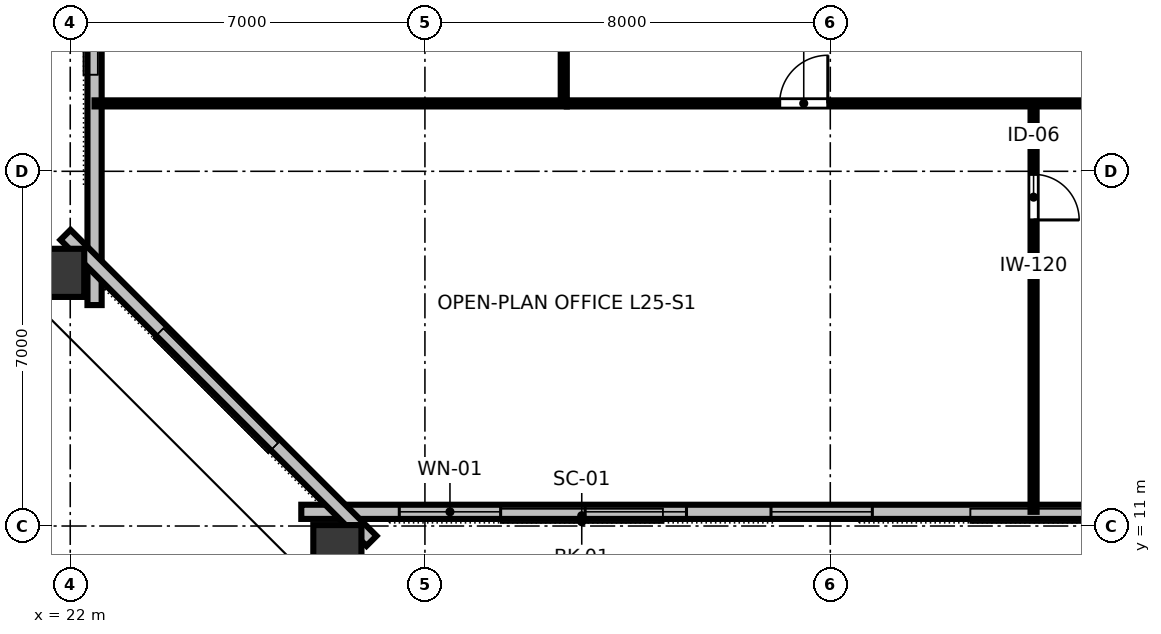
"""IFC4 building model, lengths in metres.
Left out: names, types, materials, properties, quantities, classifications, styles, units other than length and angle.
Written with IfcOpenShell. Run it as: python <this file> out.ifc"""

import sys

from ifc_helpers import new_model, si_unit, direction, frame, frame_2d, origin, origin_2d, place, context, subcontext, project, spatial, rectangle, hollow_rectangle, extrude, element, fill, save


model = new_model("IFC4")
c1 = context("Model", 3, precision=1e-05, world=origin(), true_north=direction((0.0, 1.0)))
c2 = subcontext(c1, "Body", "Model", "MODEL_VIEW")
j1 = project(units=[si_unit("LENGTHUNIT", "METRE"), si_unit("PLANEANGLEUNIT", "RADIAN")], contexts=[c1])
p1 = place(None, origin())
s1 = spatial("IfcSite", under=j1, at=p1, CompositionType="ELEMENT")
p2 = place(p1, origin())
s2 = spatial("IfcBuilding", under=s1, at=p2, CompositionType="ELEMENT")
p3 = place(p2, frame((0.0, 0.0, 98.8)))
s3 = spatial("IfcBuildingStorey", under=s2, at=p3, CompositionType="ELEMENT", Elevation=98.8)
for number, where, z_axis, x_axis in (
    (1, (27.272, 10.444, 0.0), (0.0, 0.0, 1.0), (1.0, 0.0, 0.0)),
    (2, (21.701, 15.996, 0.0), (0.0, 0.0, 1.0), (0.0, 1.0, 0.0)),
):
    element("IfcColumn", number, at=place(p3, frame(where, z_axis=z_axis, x_axis=x_axis)), inside=s3, PredefinedType="COLUMN", context=c2, shape_type="SweptSolid", body=[
        extrude(hollow_rectangle(XDim=0.95, YDim=1.15, WallThickness=0.06, at=origin_2d()), origin(), (0.0, 0.0, 1.0), 3.358),
    ])
p4 = place(p3, frame((26.56, 11.28, 0.0), z_axis=(0.0, 0.0, 1.0), x_axis=(1.0, 0.0, 0.0)))
e3 = element("IfcWall", 3, at=p4, inside=s3, PredefinedType="STANDARD", context=c2, shape_type="SweptSolid", body=[
    extrude(rectangle(XDim=38.88, YDim=0.28, at=frame_2d((19.44, 0.0))), origin(), (0.0, 0.0, 1.0), 3.36),
])
p5 = place(p4, frame((1.934, 0.0, 0.8)))
e4 = element("IfcOpeningElement", 4, at=p5, cuts=e3, PredefinedType="OPENING", context=c2, shape_type="SweptSolid", body=[
    extrude(rectangle(XDim=2.0, YDim=1.95, at=frame_2d((1.0, 0.975))), frame((0.0, 0.15, 0.0), z_axis=(0.0, -1.0, 0.0), x_axis=(1.0, 0.0, 0.0)), (0.0, 0.0, 1.0), 0.3),
])
p6 = place(p4, frame((5.602, 0.0, 0.8)))
e5 = element("IfcOpeningElement", 5, at=p6, cuts=e3, PredefinedType="OPENING", context=c2, shape_type="SweptSolid", body=[
    extrude(rectangle(XDim=2.0, YDim=1.95, at=frame_2d((1.0, 0.975))), frame((0.0, 0.15, 0.0), z_axis=(0.0, -1.0, 0.0), x_axis=(1.0, 0.0, 0.0)), (0.0, 0.0, 1.0), 0.3),
])
p7 = place(p4, frame((9.27, 0.0, 0.8)))
e6 = element("IfcOpeningElement", 6, at=p7, cuts=e3, PredefinedType="OPENING", context=c2, shape_type="SweptSolid", body=[
    extrude(rectangle(XDim=2.0, YDim=1.95, at=frame_2d((1.0, 0.975))), frame((0.0, 0.15, 0.0), z_axis=(0.0, -1.0, 0.0), x_axis=(1.0, 0.0, 0.0)), (0.0, 0.0, 1.0), 0.3),
])
p8 = place(p4, frame((23.942, 0.0, 0.8)))
e7 = element("IfcOpeningElement", 7, at=p8, cuts=e3, PredefinedType="OPENING", context=c2, shape_type="SweptSolid", body=[
    extrude(rectangle(XDim=2.0, YDim=1.95, at=frame_2d((1.0, 0.975))), frame((0.0, 0.15, 0.0), z_axis=(0.0, -1.0, 0.0), x_axis=(1.0, 0.0, 0.0)), (0.0, 0.0, 1.0), 0.3),
])
p9 = place(p4, frame((27.61, 0.0, 0.8)))
e8 = element("IfcOpeningElement", 8, at=p9, cuts=e3, PredefinedType="OPENING", context=c2, shape_type="SweptSolid", body=[
    extrude(rectangle(XDim=2.0, YDim=1.95, at=frame_2d((1.0, 0.975))), frame((0.0, 0.15, 0.0), z_axis=(0.0, -1.0, 0.0), x_axis=(1.0, 0.0, 0.0)), (0.0, 0.0, 1.0), 0.3),
])
p10 = place(p4, frame((31.278, 0.0, 0.8)))
e9 = element("IfcOpeningElement", 9, at=p10, cuts=e3, PredefinedType="OPENING", context=c2, shape_type="SweptSolid", body=[
    extrude(rectangle(XDim=2.0, YDim=1.95, at=frame_2d((1.0, 0.975))), frame((0.0, 0.15, 0.0), z_axis=(0.0, -1.0, 0.0), x_axis=(1.0, 0.0, 0.0)), (0.0, 0.0, 1.0), 0.3),
])
p11 = place(p4, frame((34.946, 0.0, 0.8)))
e10 = element("IfcOpeningElement", 10, at=p11, cuts=e3, PredefinedType="OPENING", context=c2, shape_type="SweptSolid", body=[
    extrude(rectangle(XDim=2.0, YDim=1.95, at=frame_2d((1.0, 0.975))), frame((0.0, 0.15, 0.0), z_axis=(0.0, -1.0, 0.0), x_axis=(1.0, 0.0, 0.0)), (0.0, 0.0, 1.0), 0.3),
])
p12 = place(p3, frame((22.48, 48.64, 0.0), z_axis=(0.0, 0.0, 1.0), x_axis=(0.0, -1.0, 0.0)))
e11 = element("IfcWall", 11, at=p12, inside=s3, PredefinedType="STANDARD", context=c2, shape_type="SweptSolid", body=[
    extrude(rectangle(XDim=33.28, YDim=0.28, at=frame_2d((16.64, 0.0))), origin(), (0.0, 0.0, 1.0), 3.36),
])
p13 = place(p12, frame((5.927, 0.0, 0.8)))
e12 = element("IfcOpeningElement", 12, at=p13, cuts=e11, PredefinedType="OPENING", context=c2, shape_type="SweptSolid", body=[
    extrude(rectangle(XDim=2.0, YDim=1.95, at=frame_2d((1.0, 0.975))), frame((0.0, 0.15, 0.0), z_axis=(0.0, -1.0, 0.0), x_axis=(1.0, 0.0, 0.0)), (0.0, 0.0, 1.0), 0.3),
])
p14 = place(p12, frame((9.812, 0.0, 0.8)))
e13 = element("IfcOpeningElement", 13, at=p14, cuts=e11, PredefinedType="OPENING", context=c2, shape_type="SweptSolid", body=[
    extrude(rectangle(XDim=2.0, YDim=1.95, at=frame_2d((1.0, 0.975))), frame((0.0, 0.15, 0.0), z_axis=(0.0, -1.0, 0.0), x_axis=(1.0, 0.0, 0.0)), (0.0, 0.0, 1.0), 0.3),
])
p15 = place(p12, frame((21.468, 0.0, 0.8)))
e14 = element("IfcOpeningElement", 14, at=p15, cuts=e11, PredefinedType="OPENING", context=c2, shape_type="SweptSolid", body=[
    extrude(rectangle(XDim=2.0, YDim=1.95, at=frame_2d((1.0, 0.975))), frame((0.0, 0.15, 0.0), z_axis=(0.0, -1.0, 0.0), x_axis=(1.0, 0.0, 0.0)), (0.0, 0.0, 1.0), 0.3),
])
p16 = place(p12, frame((25.353, 0.0, 0.8)))
e15 = element("IfcOpeningElement", 15, at=p16, cuts=e11, PredefinedType="OPENING", context=c2, shape_type="SweptSolid", body=[
    extrude(rectangle(XDim=2.0, YDim=1.95, at=frame_2d((1.0, 0.975))), frame((0.0, 0.15, 0.0), z_axis=(0.0, -1.0, 0.0), x_axis=(1.0, 0.0, 0.0)), (0.0, 0.0, 1.0), 0.3),
])
p17 = place(p3, frame((21.906, 16.746, 0.0), z_axis=(0.0, 0.0, 1.0), x_axis=(0.707106781187, -0.707106781187, 0.0)))
e16 = element("IfcWall", 16, at=p17, inside=s3, PredefinedType="STANDARD", context=c2, shape_type="SweptSolid", body=[
    extrude(rectangle(XDim=8.541, YDim=0.28, at=frame_2d((4.271, 0.0))), origin(), (0.0, 0.0, 1.0), 3.36),
])
p18 = place(p3, frame((41.012, 19.34, 0.0), z_axis=(0.0, 0.0, 1.0), x_axis=(0.0, -1.0, 0.0)))
e17 = element("IfcWall", 17, at=p18, inside=s3, PredefinedType="PARTITIONING", context=c2, shape_type="SweptSolid", body=[
    extrude(rectangle(XDim=8.06, YDim=0.12, at=frame_2d((4.03, 0.0))), origin(), (0.0, 0.0, 1.0), 2.64),
])
p19 = place(p18, frame((1.4, 0.0, 0.0)))
e18 = element("IfcOpeningElement", 18, at=p19, cuts=e17, PredefinedType="OPENING", context=c2, shape_type="SweptSolid", body=[
    extrude(rectangle(XDim=0.9, YDim=2.15, at=frame_2d((0.45, 1.075))), frame((0.0, 0.07, 0.0), z_axis=(0.0, -1.0, 0.0), x_axis=(1.0, 0.0, 0.0)), (0.0, 0.0, 1.0), 0.14),
])
p20 = place(p3, frame((31.8, 19.34, 0.0), z_axis=(0.0, 0.0, 1.0), x_axis=(1.0, 0.0, 0.0)))
e19 = element("IfcWall", 19, at=p20, inside=s3, PredefinedType="PARTITIONING", context=c2, shape_type="SweptSolid", body=[
    extrude(rectangle(XDim=28.4, YDim=0.12, at=frame_2d((14.2, 0.0))), origin(), (0.0, 0.0, 1.0), 2.64),
])
p21 = place(p20, frame((4.201, 0.0, 0.0)))
e20 = element("IfcOpeningElement", 20, at=p21, cuts=e19, PredefinedType="OPENING", context=c2, shape_type="SweptSolid", body=[
    extrude(rectangle(XDim=0.95, YDim=2.15, at=frame_2d((0.475, 1.075))), frame((0.0, 0.07, 0.0), z_axis=(0.0, -1.0, 0.0), x_axis=(1.0, 0.0, 0.0)), (0.0, 0.0, 1.0), 0.14),
])
p22 = place(p20, frame((11.29, 0.0, 0.0)))
e21 = element("IfcOpeningElement", 21, at=p22, cuts=e19, PredefinedType="OPENING", context=c2, shape_type="SweptSolid", body=[
    extrude(rectangle(XDim=0.95, YDim=2.15, at=frame_2d((0.475, 1.075))), frame((0.0, 0.07, 0.0), z_axis=(0.0, -1.0, 0.0), x_axis=(1.0, 0.0, 0.0)), (0.0, 0.0, 1.0), 0.14),
])
p23 = place(p20, frame((17.423, 0.0, 0.0)))
e22 = element("IfcOpeningElement", 22, at=p23, cuts=e19, PredefinedType="OPENING", context=c2, shape_type="SweptSolid", body=[
    extrude(rectangle(XDim=0.95, YDim=2.15, at=frame_2d((0.475, 1.075))), frame((0.0, 0.07, 0.0), z_axis=(0.0, -1.0, 0.0), x_axis=(1.0, 0.0, 0.0)), (0.0, 0.0, 1.0), 0.14),
])
p24 = place(p20, frame((24.394, 0.0, 0.0)))
e23 = element("IfcOpeningElement", 23, at=p24, cuts=e19, PredefinedType="OPENING", context=c2, shape_type="SweptSolid", body=[
    extrude(rectangle(XDim=0.95, YDim=2.15, at=frame_2d((0.475, 1.075))), frame((0.0, 0.07, 0.0), z_axis=(0.0, -1.0, 0.0), x_axis=(1.0, 0.0, 0.0)), (0.0, 0.0, 1.0), 0.14),
])
p25 = place(p3, frame((31.74, 19.4, 0.0), z_axis=(0.0, 0.0, 1.0), x_axis=(0.0, 1.0, 0.0)))
e24 = element("IfcWall", 24, at=p25, inside=s3, PredefinedType="PARTITIONING", context=c2, shape_type="SweptSolid", body=[
    extrude(rectangle(XDim=11.58, YDim=0.12, at=frame_2d((5.79, 0.0))), origin(), (0.0, 0.0, 1.0), 2.64),
])
p26 = place(p25, frame((5.415, 0.0, 0.0)))
e25 = element("IfcOpeningElement", 25, at=p26, cuts=e24, PredefinedType="OPENING", context=c2, shape_type="SweptSolid", body=[
    extrude(rectangle(XDim=0.95, YDim=2.15, at=frame_2d((0.475, 1.075))), frame((0.0, 0.07, 0.0), z_axis=(0.0, -1.0, 0.0), x_axis=(1.0, 0.0, 0.0)), (0.0, 0.0, 1.0), 0.14),
])
p27 = place(p3, frame((31.8, 19.34, 0.0), z_axis=(0.0, 0.0, 1.0), x_axis=(-1.0, 0.0, 0.0)))
e26 = element("IfcWall", 26, at=p27, inside=s3, PredefinedType="PARTITIONING", context=c2, shape_type="SweptSolid", body=[
    extrude(rectangle(XDim=9.32, YDim=0.12, at=frame_2d((4.66, 0.0))), origin(), (0.0, 0.0, 1.0), 2.64),
])
p28 = place(p5, origin())
e27 = element("IfcWindow", 27, at=p28, inside=s3, PartitioningType="SINGLE_PANEL", PredefinedType="WINDOW", context=c2, shape_type="SweptSolid", body=[
    extrude(rectangle(XDim=2.0, YDim=1.95, at=frame_2d((1.0, 0.975))), frame((0.0, 0.03, 0.0), z_axis=(0.0, -1.0, 0.0), x_axis=(1.0, 0.0, 0.0)), (0.0, 0.0, 1.0), 0.06),
])
fill(e4, e27)
p29 = place(p6, origin())
e28 = element("IfcWindow", 28, at=p29, inside=s3, PartitioningType="SINGLE_PANEL", PredefinedType="WINDOW", context=c2, shape_type="SweptSolid", body=[
    extrude(rectangle(XDim=2.0, YDim=1.95, at=frame_2d((1.0, 0.975))), frame((0.0, 0.03, 0.0), z_axis=(0.0, -1.0, 0.0), x_axis=(1.0, 0.0, 0.0)), (0.0, 0.0, 1.0), 0.06),
])
fill(e5, e28)
p30 = place(p7, origin())
e29 = element("IfcWindow", 29, at=p30, inside=s3, PartitioningType="SINGLE_PANEL", PredefinedType="WINDOW", context=c2, shape_type="SweptSolid", body=[
    extrude(rectangle(XDim=2.0, YDim=1.95, at=frame_2d((1.0, 0.975))), frame((0.0, 0.03, 0.0), z_axis=(0.0, -1.0, 0.0), x_axis=(1.0, 0.0, 0.0)), (0.0, 0.0, 1.0), 0.06),
])
fill(e6, e29)
p31 = place(p19, origin())
e30 = element("IfcDoor", 30, at=p31, inside=s3, OperationType="SINGLE_SWING_RIGHT", PredefinedType="DOOR", context=c2, shape_type="SweptSolid", body=[
    extrude(rectangle(XDim=0.9, YDim=2.15, at=frame_2d((0.45, 1.075))), frame((0.0, 0.025, 0.0), z_axis=(0.0, -1.0, 0.0), x_axis=(1.0, 0.0, 0.0)), (0.0, 0.0, 1.0), 0.05),
])
fill(e18, e30)
p32 = place(p21, origin())
e31 = element("IfcDoor", 31, at=p32, inside=s3, OperationType="SINGLE_SWING_RIGHT", PredefinedType="DOOR", context=c2, shape_type="SweptSolid", body=[
    extrude(rectangle(XDim=0.95, YDim=2.15, at=frame_2d((0.475, 1.075))), frame((0.0, 0.025, 0.0), z_axis=(0.0, -1.0, 0.0), x_axis=(1.0, 0.0, 0.0)), (0.0, 0.0, 1.0), 0.05),
])
fill(e20, e31)
save(model, sys.argv[1])
